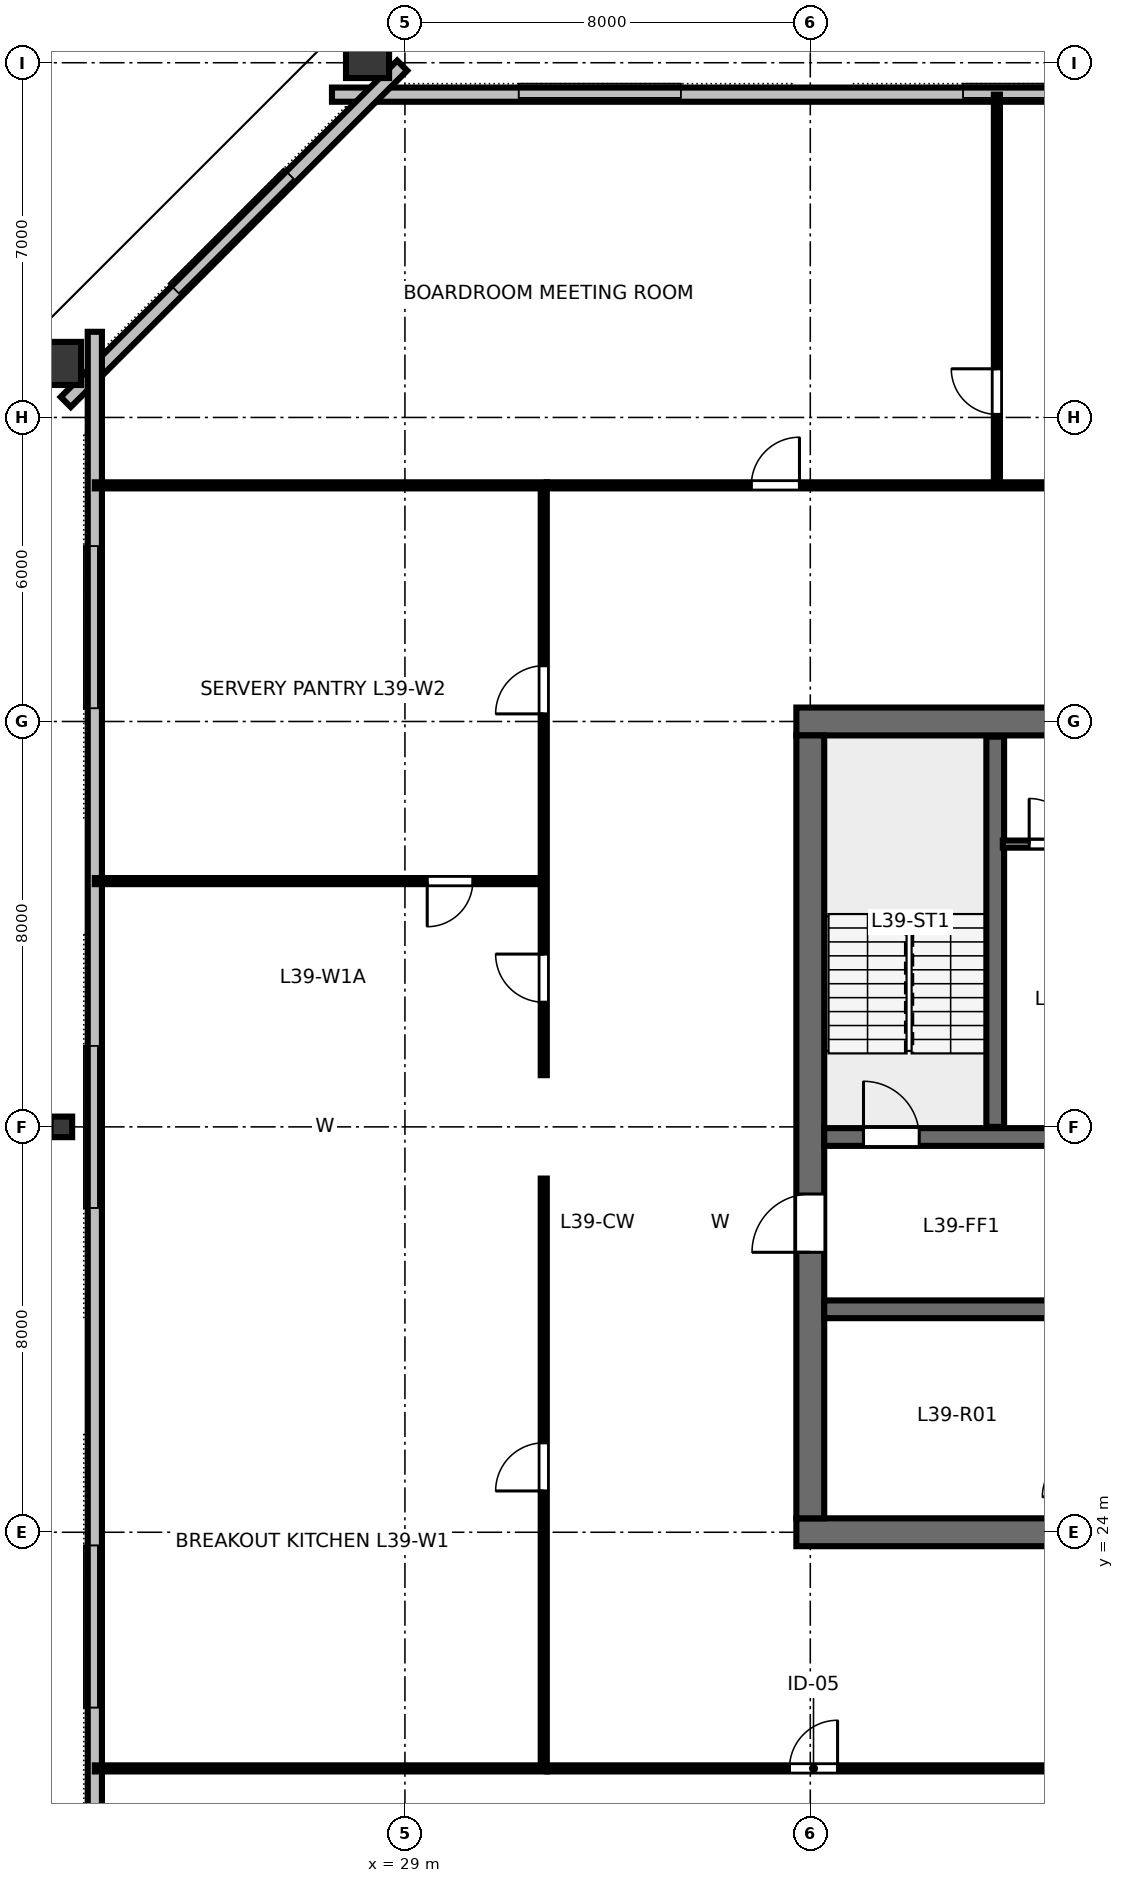
"""IFC4 building model, lengths in metres.
Left out: names, types, materials, properties, quantities, classifications, styles, units other than length and angle.
Written with IfcOpenShell. Run it as: python <this file> out.ifc"""

import sys

from ifc_helpers import new_model, si_unit, direction, frame, frame_2d, origin, origin_2d, place, context, subcontext, project, spatial, rectangle, hollow_rectangle, i_section, extrude, element, fill, save


model = new_model("IFC4")
c1 = context("Model", 3, precision=1e-05, world=origin(), true_north=direction((0.0, 1.0)))
c2 = subcontext(c1, "Body", "Model", "MODEL_VIEW")
j1 = project(units=[si_unit("LENGTHUNIT", "METRE"), si_unit("PLANEANGLEUNIT", "RADIAN")], contexts=[c1])
p1 = place(None, origin())
s1 = spatial("IfcSite", under=j1, at=p1, CompositionType="ELEMENT")
p2 = place(p1, origin())
s2 = spatial("IfcBuilding", under=s1, at=p2, CompositionType="ELEMENT")
p3 = place(p2, frame((0.0, 0.0, 149.2)))
s3 = spatial("IfcBuildingStorey", under=s2, at=p3, CompositionType="ELEMENT", Elevation=149.2)
p4 = place(p3, frame((36.725, 24.0, 0.0), z_axis=(0.0, 0.0, 1.0), x_axis=(1.0, 0.0, 0.0)))
e1 = element("IfcWall", 1, at=p4, inside=s3, PredefinedType="SHEAR", context=c2, shape_type="SweptSolid", body=[
    extrude(rectangle(XDim=18.55, YDim=0.55, at=frame_2d((9.275, 0.0))), origin(), (0.0, 0.0, 1.0), 3.36),
])
p5 = place(p4, frame((8.275, 0.0, 0.0)))
e2 = element("IfcOpeningElement", 2, at=p5, cuts=e1, PredefinedType="OPENING", context=c2, shape_type="SweptSolid", body=[
    extrude(rectangle(XDim=1.6, YDim=2.15, at=frame_2d((0.8, 1.075))), frame((0.0, 0.285, 0.0), z_axis=(0.0, -1.0, 0.0), x_axis=(1.0, 0.0, 0.0)), (0.0, 0.0, 1.0), 0.57),
])
p6 = place(p4, frame((13.675, 0.0, 0.0)))
e3 = element("IfcOpeningElement", 3, at=p6, cuts=e1, PredefinedType="OPENING", context=c2, shape_type="SweptSolid", body=[
    extrude(rectangle(XDim=1.6, YDim=2.15, at=frame_2d((0.8, 1.075))), frame((0.0, 0.285, 0.0), z_axis=(0.0, -1.0, 0.0), x_axis=(1.0, 0.0, 0.0)), (0.0, 0.0, 1.0), 0.57),
])
p7 = place(p3, frame((36.725, 40.0, 0.0), z_axis=(0.0, 0.0, 1.0), x_axis=(1.0, 0.0, 0.0)))
e4 = element("IfcWall", 4, at=p7, inside=s3, PredefinedType="SHEAR", context=c2, shape_type="SweptSolid", body=[
    extrude(rectangle(XDim=18.55, YDim=0.55, at=frame_2d((9.275, 0.0))), origin(), (0.0, 0.0, 1.0), 3.36),
])
p8 = place(p7, frame((8.775, 0.0, 0.0)))
e5 = element("IfcOpeningElement", 5, at=p8, cuts=e4, PredefinedType="OPENING", context=c2, shape_type="SweptSolid", body=[
    extrude(rectangle(XDim=1.0, YDim=2.15, at=frame_2d((0.5, 1.075))), frame((0.0, 0.285, 0.0), z_axis=(0.0, -1.0, 0.0), x_axis=(1.0, 0.0, 0.0)), (0.0, 0.0, 1.0), 0.57),
])
p9 = place(p3, frame((37.0, 24.275, 0.0), z_axis=(0.0, 0.0, 1.0), x_axis=(0.0, 1.0, 0.0)))
e6 = element("IfcWall", 6, at=p9, inside=s3, PredefinedType="SHEAR", context=c2, shape_type="SweptSolid", body=[
    extrude(rectangle(XDim=15.45, YDim=0.55, at=frame_2d((7.725, 0.0))), origin(), (0.0, 0.0, 1.0), 3.36),
])
p10 = place(p9, frame((5.25, 0.0, 0.0)))
e7 = element("IfcOpeningElement", 7, at=p10, cuts=e6, PredefinedType="OPENING", context=c2, shape_type="SweptSolid", body=[
    extrude(rectangle(XDim=1.15, YDim=2.15, at=frame_2d((0.575, 1.075))), frame((0.0, 0.285, 0.0), z_axis=(0.0, -1.0, 0.0), x_axis=(1.0, 0.0, 0.0)), (0.0, 0.0, 1.0), 0.57),
])
p11 = place(p3, frame((37.275, 31.8, 0.0), z_axis=(0.0, 0.0, 1.0), x_axis=(1.0, 0.0, 0.0)))
e8 = element("IfcWall", 8, at=p11, inside=s3, PredefinedType="SHEAR", context=c2, shape_type="SweptSolid", body=[
    extrude(rectangle(XDim=17.45, YDim=0.35, at=frame_2d((8.725, 0.0))), origin(), (0.0, 0.0, 1.0), 3.36),
])
p12 = place(p11, frame((0.775, 0.0, 0.0)))
e9 = element("IfcOpeningElement", 9, at=p12, cuts=e8, PredefinedType="OPENING", context=c2, shape_type="SweptSolid", body=[
    extrude(rectangle(XDim=1.1, YDim=2.15, at=frame_2d((0.55, 1.075))), frame((0.0, 0.185, 0.0), z_axis=(0.0, -1.0, 0.0), x_axis=(1.0, 0.0, 0.0)), (0.0, 0.0, 1.0), 0.37),
])
p13 = place(p11, frame((14.675, 0.0, 0.0)))
e10 = element("IfcOpeningElement", 10, at=p13, cuts=e8, PredefinedType="OPENING", context=c2, shape_type="SweptSolid", body=[
    extrude(rectangle(XDim=1.1, YDim=2.15, at=frame_2d((0.55, 1.075))), frame((0.0, 0.185, 0.0), z_axis=(0.0, -1.0, 0.0), x_axis=(1.0, 0.0, 0.0)), (0.0, 0.0, 1.0), 0.37),
])
p14 = place(p3, frame((37.275, 28.4, 0.0), z_axis=(0.0, 0.0, 1.0), x_axis=(1.0, 0.0, 0.0)))
e11 = element("IfcWall", 11, at=p14, inside=s3, PredefinedType="SHEAR", context=c2, shape_type="SweptSolid", body=[
    extrude(rectangle(XDim=17.45, YDim=0.35, at=frame_2d((8.725, 0.0))), origin(), (0.0, 0.0, 1.0), 3.36),
])
for number, where, z_axis, x_axis in (
    (12, (28.262, 53.198, 0.0), (0.0, 0.0, 1.0), (1.0, 0.0, 0.0)),
    (13, (22.109, 47.066, 0.0), (0.0, 0.0, 1.0), (0.0, 1.0, 0.0)),
):
    element("IfcColumn", number, at=place(p3, frame(where, z_axis=z_axis, x_axis=x_axis)), inside=s3, PredefinedType="COLUMN", context=c2, shape_type="SweptSolid", body=[
        extrude(hollow_rectangle(XDim=0.85, YDim=1.0, WallThickness=0.05, at=origin_2d()), origin(), (0.0, 0.0, 1.0), 3.358),
    ])
p15 = place(p3, frame((22.22, 32.0, 0.0), z_axis=(0.0, 0.0, 1.0), x_axis=(0.0, 1.0, 0.0)))
e14 = element("IfcColumn", 14, at=p15, inside=s3, PredefinedType="COLUMN", context=c2, shape_type="SweptSolid", body=[
    extrude(i_section(OverallWidth=0.406, OverallDepth=0.425, WebThickness=0.033, FlangeThickness=0.052, FilletRadius=0.025, at=origin_2d()), origin(), (0.0, 0.0, 1.0), 3.358),
])
p16 = place(p3, frame((64.44, 52.37, 0.0), z_axis=(0.0, 0.0, 1.0), x_axis=(-1.0, 0.0, 0.0)))
e15 = element("IfcWall", 15, at=p16, inside=s3, PredefinedType="STANDARD", context=c2, shape_type="SweptSolid", body=[
    extrude(rectangle(XDim=36.88, YDim=0.28, at=frame_2d((18.44, 0.0))), origin(), (0.0, 0.0, 1.0), 3.36),
])
p17 = place(p3, frame((28.946, 52.944, 0.0), z_axis=(0.0, 0.0, 1.0), x_axis=(-0.707106781187, -0.707106781187, 0.0)))
e16 = element("IfcWall", 16, at=p17, inside=s3, PredefinedType="STANDARD", context=c2, shape_type="SweptSolid", body=[
    extrude(rectangle(XDim=9.39, YDim=0.28, at=frame_2d((4.695, 0.0))), origin(), (0.0, 0.0, 1.0), 3.36),
])
p18 = place(p3, frame((22.88, 47.69, 0.0), z_axis=(0.0, 0.0, 1.0), x_axis=(0.0, -1.0, 0.0)))
e17 = element("IfcWall", 17, at=p18, inside=s3, PredefinedType="STANDARD", context=c2, shape_type="SweptSolid", body=[
    extrude(rectangle(XDim=31.38, YDim=0.28, at=frame_2d((15.69, 0.0))), origin(), (0.0, 0.0, 1.0), 3.36),
])
p19 = place(p3, frame((40.65, 32.0, 0.0), z_axis=(0.0, 0.0, 1.0), x_axis=(0.0, 1.0, 0.0)))
e18 = element("IfcWall", 18, at=p19, inside=s3, PredefinedType="SHEAR", context=c2, shape_type="SweptSolid", body=[
    extrude(rectangle(XDim=7.7, YDim=0.35, at=frame_2d((3.85, 0.0))), origin(), (0.0, 0.0, 1.0), 3.6),
])
p20 = place(p3, frame((40.8, 37.58, 0.0), z_axis=(0.0, 0.0, 1.0), x_axis=(1.0, 0.0, 0.0)))
e19 = element("IfcWall", 19, at=p20, inside=s3, PredefinedType="PARTITIONING", context=c2, shape_type="SweptSolid", body=[
    extrude(rectangle(XDim=10.4, YDim=0.14, at=frame_2d((5.2, 0.0))), origin(), (0.0, 0.0, 1.0), 3.36),
])
p21 = place(p20, frame((0.52, 0.0, 0.0)))
e20 = element("IfcOpeningElement", 20, at=p21, cuts=e19, PredefinedType="OPENING", context=c2, shape_type="SweptSolid", body=[
    extrude(rectangle(XDim=0.9, YDim=2.15, at=frame_2d((0.45, 1.075))), frame((0.0, 0.08, 0.0), z_axis=(0.0, -1.0, 0.0), x_axis=(1.0, 0.0, 0.0)), (0.0, 0.0, 1.0), 0.16),
])
p22 = place(p20, frame((2.6, 0.0, 0.0)))
e21 = element("IfcOpeningElement", 21, at=p22, cuts=e19, PredefinedType="OPENING", context=c2, shape_type="SweptSolid", body=[
    extrude(rectangle(XDim=0.9, YDim=2.15, at=frame_2d((0.45, 1.075))), frame((0.0, 0.08, 0.0), z_axis=(0.0, -1.0, 0.0), x_axis=(1.0, 0.0, 0.0)), (0.0, 0.0, 1.0), 0.16),
])
p23 = place(p20, frame((4.68, 0.0, 0.0)))
e22 = element("IfcOpeningElement", 22, at=p23, cuts=e19, PredefinedType="OPENING", context=c2, shape_type="SweptSolid", body=[
    extrude(rectangle(XDim=0.92, YDim=2.15, at=frame_2d((0.46, 1.075))), frame((0.0, 0.08, 0.0), z_axis=(0.0, -1.0, 0.0), x_axis=(1.0, 0.0, 0.0)), (0.0, 0.0, 1.0), 0.16),
])
p24 = place(p20, frame((6.76, 0.0, 0.0)))
e23 = element("IfcOpeningElement", 23, at=p24, cuts=e19, PredefinedType="OPENING", context=c2, shape_type="SweptSolid", body=[
    extrude(rectangle(XDim=0.9, YDim=2.15, at=frame_2d((0.45, 1.075))), frame((0.0, 0.08, 0.0), z_axis=(0.0, -1.0, 0.0), x_axis=(1.0, 0.0, 0.0)), (0.0, 0.0, 1.0), 0.16),
])
p25 = place(p20, frame((8.84, 0.0, 0.0)))
e24 = element("IfcOpeningElement", 24, at=p25, cuts=e19, PredefinedType="OPENING", context=c2, shape_type="SweptSolid", body=[
    extrude(rectangle(XDim=0.9, YDim=2.15, at=frame_2d((0.45, 1.075))), frame((0.0, 0.08, 0.0), z_axis=(0.0, -1.0, 0.0), x_axis=(1.0, 0.0, 0.0)), (0.0, 0.0, 1.0), 0.16),
])
p26 = place(p3, frame((31.8, 19.34, 0.0), z_axis=(0.0, 0.0, 1.0), x_axis=(1.0, 0.0, 0.0)))
e25 = element("IfcWall", 25, at=p26, inside=s3, PredefinedType="PARTITIONING", context=c2, shape_type="SweptSolid", body=[
    extrude(rectangle(XDim=28.4, YDim=0.12, at=frame_2d((14.2, 0.0))), origin(), (0.0, 0.0, 1.0), 2.64),
])
p27 = place(p26, frame((4.789, 0.0, 0.0)))
e26 = element("IfcOpeningElement", 26, at=p27, cuts=e25, PredefinedType="OPENING", context=c2, shape_type="SweptSolid", body=[
    extrude(rectangle(XDim=0.95, YDim=2.15, at=frame_2d((0.475, 1.075))), frame((0.0, 0.07, 0.0), z_axis=(0.0, -1.0, 0.0), x_axis=(1.0, 0.0, 0.0)), (0.0, 0.0, 1.0), 0.14),
])
p28 = place(p26, frame((12.708, 0.0, 0.0)))
e27 = element("IfcOpeningElement", 27, at=p28, cuts=e25, PredefinedType="OPENING", context=c2, shape_type="SweptSolid", body=[
    extrude(rectangle(XDim=0.95, YDim=2.15, at=frame_2d((0.475, 1.075))), frame((0.0, 0.07, 0.0), z_axis=(0.0, -1.0, 0.0), x_axis=(1.0, 0.0, 0.0)), (0.0, 0.0, 1.0), 0.14),
])
p29 = place(p26, frame((21.645, 0.0, 0.0)))
e28 = element("IfcOpeningElement", 28, at=p29, cuts=e25, PredefinedType="OPENING", context=c2, shape_type="SweptSolid", body=[
    extrude(rectangle(XDim=0.95, YDim=2.15, at=frame_2d((0.475, 1.075))), frame((0.0, 0.07, 0.0), z_axis=(0.0, -1.0, 0.0), x_axis=(1.0, 0.0, 0.0)), (0.0, 0.0, 1.0), 0.14),
])
p30 = place(p3, frame((40.683, 44.66, 0.0), z_axis=(0.0, 0.0, 1.0), x_axis=(0.0, 1.0, 0.0)))
e29 = element("IfcWall", 29, at=p30, inside=s3, PredefinedType="PARTITIONING", context=c2, shape_type="SweptSolid", body=[
    extrude(rectangle(XDim=7.71, YDim=0.12, at=frame_2d((3.855, 0.0))), origin(), (0.0, 0.0, 1.0), 2.64),
])
p31 = place(p30, frame((1.4, 0.0, 0.0)))
e30 = element("IfcOpeningElement", 30, at=p31, cuts=e29, PredefinedType="OPENING", context=c2, shape_type="SweptSolid", body=[
    extrude(rectangle(XDim=0.9, YDim=2.15, at=frame_2d((0.45, 1.075))), frame((0.0, 0.07, 0.0), z_axis=(0.0, -1.0, 0.0), x_axis=(1.0, 0.0, 0.0)), (0.0, 0.0, 1.0), 0.14),
])
p32 = place(p3, frame((31.8, 44.66, 0.0), z_axis=(0.0, 0.0, 1.0), x_axis=(1.0, 0.0, 0.0)))
e31 = element("IfcWall", 31, at=p32, inside=s3, PredefinedType="PARTITIONING", context=c2, shape_type="SweptSolid", body=[
    extrude(rectangle(XDim=28.4, YDim=0.12, at=frame_2d((14.2, 0.0))), origin(), (0.0, 0.0, 1.0), 2.64),
])
p33 = place(p32, frame((4.036, 0.0, 0.0)))
e32 = element("IfcOpeningElement", 32, at=p33, cuts=e31, PredefinedType="OPENING", context=c2, shape_type="SweptSolid", body=[
    extrude(rectangle(XDim=0.95, YDim=2.15, at=frame_2d((0.475, 1.075))), frame((0.0, 0.07, 0.0), z_axis=(0.0, -1.0, 0.0), x_axis=(1.0, 0.0, 0.0)), (0.0, 0.0, 1.0), 0.14),
])
p34 = place(p32, frame((12.256, 0.0, 0.0)))
e33 = element("IfcOpeningElement", 33, at=p34, cuts=e31, PredefinedType="OPENING", context=c2, shape_type="SweptSolid", body=[
    extrude(rectangle(XDim=0.95, YDim=2.15, at=frame_2d((0.475, 1.075))), frame((0.0, 0.07, 0.0), z_axis=(0.0, -1.0, 0.0), x_axis=(1.0, 0.0, 0.0)), (0.0, 0.0, 1.0), 0.14),
])
p35 = place(p32, frame((18.246, 0.0, 0.0)))
e34 = element("IfcOpeningElement", 34, at=p35, cuts=e31, PredefinedType="OPENING", context=c2, shape_type="SweptSolid", body=[
    extrude(rectangle(XDim=0.95, YDim=2.15, at=frame_2d((0.475, 1.075))), frame((0.0, 0.07, 0.0), z_axis=(0.0, -1.0, 0.0), x_axis=(1.0, 0.0, 0.0)), (0.0, 0.0, 1.0), 0.14),
])
p36 = place(p32, frame((24.086, 0.0, 0.0)))
e35 = element("IfcOpeningElement", 35, at=p36, cuts=e31, PredefinedType="OPENING", context=c2, shape_type="SweptSolid", body=[
    extrude(rectangle(XDim=0.95, YDim=2.15, at=frame_2d((0.475, 1.075))), frame((0.0, 0.07, 0.0), z_axis=(0.0, -1.0, 0.0), x_axis=(1.0, 0.0, 0.0)), (0.0, 0.0, 1.0), 0.14),
])
p37 = place(p3, frame((31.74, 36.85, 0.0), z_axis=(0.0, 0.0, 1.0), x_axis=(-1.0, 0.0, 0.0)))
e36 = element("IfcWall", 36, at=p37, inside=s3, PredefinedType="PARTITIONING", context=c2, shape_type="SweptSolid", body=[
    extrude(rectangle(XDim=8.86, YDim=0.12, at=frame_2d((4.43, 0.0))), origin(), (0.0, 0.0, 1.0), 2.64),
])
p38 = place(p37, frame((1.4, 0.0, 0.0)))
e37 = element("IfcOpeningElement", 37, at=p38, cuts=e36, PredefinedType="OPENING", context=c2, shape_type="SweptSolid", body=[
    extrude(rectangle(XDim=0.9, YDim=2.15, at=frame_2d((0.45, 1.075))), frame((0.0, 0.07, 0.0), z_axis=(0.0, -1.0, 0.0), x_axis=(1.0, 0.0, 0.0)), (0.0, 0.0, 1.0), 0.14),
])
p39 = place(p3, frame((31.74, 19.4, 0.0), z_axis=(0.0, 0.0, 1.0), x_axis=(0.0, 1.0, 0.0)))
e38 = element("IfcWall", 38, at=p39, inside=s3, PredefinedType="PARTITIONING", context=c2, shape_type="SweptSolid", body=[
    extrude(rectangle(XDim=11.58, YDim=0.12, at=frame_2d((5.79, 0.0))), origin(), (0.0, 0.0, 1.0), 2.64),
])
p40 = place(p39, frame((5.415, 0.0, 0.0)))
e39 = element("IfcOpeningElement", 39, at=p40, cuts=e38, PredefinedType="OPENING", context=c2, shape_type="SweptSolid", body=[
    extrude(rectangle(XDim=0.95, YDim=2.15, at=frame_2d((0.475, 1.075))), frame((0.0, 0.07, 0.0), z_axis=(0.0, -1.0, 0.0), x_axis=(1.0, 0.0, 0.0)), (0.0, 0.0, 1.0), 0.14),
])
p41 = place(p3, frame((31.74, 33.02, 0.0), z_axis=(0.0, 0.0, 1.0), x_axis=(0.0, 1.0, 0.0)))
e40 = element("IfcWall", 40, at=p41, inside=s3, PredefinedType="PARTITIONING", context=c2, shape_type="SweptSolid", body=[
    extrude(rectangle(XDim=11.58, YDim=0.12, at=frame_2d((5.79, 0.0))), origin(), (0.0, 0.0, 1.0), 2.64),
])
p42 = place(p41, frame((1.44, 0.0, 0.0)))
e41 = element("IfcOpeningElement", 41, at=p42, cuts=e40, PredefinedType="OPENING", context=c2, shape_type="SweptSolid", body=[
    extrude(rectangle(XDim=0.95, YDim=2.15, at=frame_2d((0.475, 1.075))), frame((0.0, 0.07, 0.0), z_axis=(0.0, -1.0, 0.0), x_axis=(1.0, 0.0, 0.0)), (0.0, 0.0, 1.0), 0.14),
])
p43 = place(p41, frame((7.13, 0.0, 0.0)))
e42 = element("IfcOpeningElement", 42, at=p43, cuts=e40, PredefinedType="OPENING", context=c2, shape_type="SweptSolid", body=[
    extrude(rectangle(XDim=0.95, YDim=2.15, at=frame_2d((0.475, 1.075))), frame((0.0, 0.07, 0.0), z_axis=(0.0, -1.0, 0.0), x_axis=(1.0, 0.0, 0.0)), (0.0, 0.0, 1.0), 0.14),
])
for number, where, z_axis, x_axis in (
    (43, (31.8, 19.34, 0.0), (0.0, 0.0, 1.0), (-1.0, 0.0, 0.0)),
    (44, (31.8, 44.66, 0.0), (0.0, 0.0, 1.0), (-1.0, 0.0, 0.0)),
):
    element("IfcWall", number, at=place(p3, frame(where, z_axis=z_axis, x_axis=x_axis)), inside=s3, PredefinedType="PARTITIONING", context=c2, shape_type="SweptSolid", body=[
        extrude(rectangle(XDim=8.92, YDim=0.12, at=frame_2d((4.46, 0.0))), origin(), (0.0, 0.0, 1.0), 2.64),
    ])
p44 = place(p12, origin())
e45 = element("IfcDoor", 45, at=p44, inside=s3, OperationType="SINGLE_SWING_LEFT", PredefinedType="DOOR", context=c2, shape_type="SweptSolid", body=[
    extrude(rectangle(XDim=1.1, YDim=2.15, at=frame_2d((0.55, 1.075))), frame((0.0, 0.025, 0.0), z_axis=(0.0, -1.0, 0.0), x_axis=(1.0, 0.0, 0.0)), (0.0, 0.0, 1.0), 0.05),
])
fill(e9, e45)
p45 = place(p10, origin())
e46 = element("IfcDoor", 46, at=p45, inside=s3, OperationType="SINGLE_SWING_LEFT", PredefinedType="DOOR", context=c2, shape_type="SweptSolid", body=[
    extrude(rectangle(XDim=1.15, YDim=2.15, at=frame_2d((0.575, 1.075))), frame((0.0, 0.025, 0.0), z_axis=(0.0, -1.0, 0.0), x_axis=(1.0, 0.0, 0.0)), (0.0, 0.0, 1.0), 0.05),
])
fill(e7, e46)
p46 = place(p21, origin())
e47 = element("IfcDoor", 47, at=p46, inside=s3, OperationType="SINGLE_SWING_LEFT", PredefinedType="DOOR", context=c2, shape_type="SweptSolid", body=[
    extrude(rectangle(XDim=0.9, YDim=2.15, at=frame_2d((0.45, 1.075))), frame((0.0, 0.025, 0.0), z_axis=(0.0, -1.0, 0.0), x_axis=(1.0, 0.0, 0.0)), (0.0, 0.0, 1.0), 0.05),
])
fill(e20, e47)
p47 = place(p27, origin())
e48 = element("IfcDoor", 48, at=p47, inside=s3, OperationType="SINGLE_SWING_RIGHT", PredefinedType="DOOR", context=c2, shape_type="SweptSolid", body=[
    extrude(rectangle(XDim=0.95, YDim=2.15, at=frame_2d((0.475, 1.075))), frame((0.0, 0.025, 0.0), z_axis=(0.0, -1.0, 0.0), x_axis=(1.0, 0.0, 0.0)), (0.0, 0.0, 1.0), 0.05),
])
fill(e26, e48)
p48 = place(p31, origin())
e49 = element("IfcDoor", 49, at=p48, inside=s3, OperationType="SINGLE_SWING_RIGHT", PredefinedType="DOOR", context=c2, shape_type="SweptSolid", body=[
    extrude(rectangle(XDim=0.9, YDim=2.15, at=frame_2d((0.45, 1.075))), frame((0.0, 0.025, 0.0), z_axis=(0.0, -1.0, 0.0), x_axis=(1.0, 0.0, 0.0)), (0.0, 0.0, 1.0), 0.05),
])
fill(e30, e49)
p49 = place(p33, origin())
e50 = element("IfcDoor", 50, at=p49, inside=s3, OperationType="SINGLE_SWING_RIGHT", PredefinedType="DOOR", context=c2, shape_type="SweptSolid", body=[
    extrude(rectangle(XDim=0.95, YDim=2.15, at=frame_2d((0.475, 1.075))), frame((0.0, 0.025, 0.0), z_axis=(0.0, -1.0, 0.0), x_axis=(1.0, 0.0, 0.0)), (0.0, 0.0, 1.0), 0.05),
])
fill(e32, e50)
p50 = place(p38, origin())
e51 = element("IfcDoor", 51, at=p50, inside=s3, OperationType="SINGLE_SWING_RIGHT", PredefinedType="DOOR", context=c2, shape_type="SweptSolid", body=[
    extrude(rectangle(XDim=0.9, YDim=2.15, at=frame_2d((0.45, 1.075))), frame((0.0, 0.025, 0.0), z_axis=(0.0, -1.0, 0.0), x_axis=(1.0, 0.0, 0.0)), (0.0, 0.0, 1.0), 0.05),
])
fill(e37, e51)
p51 = place(p40, origin())
e52 = element("IfcDoor", 52, at=p51, inside=s3, OperationType="SINGLE_SWING_LEFT", PredefinedType="DOOR", context=c2, shape_type="SweptSolid", body=[
    extrude(rectangle(XDim=0.95, YDim=2.15, at=frame_2d((0.475, 1.075))), frame((0.0, 0.025, 0.0), z_axis=(0.0, -1.0, 0.0), x_axis=(1.0, 0.0, 0.0)), (0.0, 0.0, 1.0), 0.05),
])
fill(e39, e52)
p52 = place(p42, origin())
e53 = element("IfcDoor", 53, at=p52, inside=s3, OperationType="SINGLE_SWING_RIGHT", PredefinedType="DOOR", context=c2, shape_type="SweptSolid", body=[
    extrude(rectangle(XDim=0.95, YDim=2.15, at=frame_2d((0.475, 1.075))), frame((0.0, 0.025, 0.0), z_axis=(0.0, -1.0, 0.0), x_axis=(1.0, 0.0, 0.0)), (0.0, 0.0, 1.0), 0.05),
])
fill(e41, e53)
p53 = place(p43, origin())
e54 = element("IfcDoor", 54, at=p53, inside=s3, OperationType="SINGLE_SWING_LEFT", PredefinedType="DOOR", context=c2, shape_type="SweptSolid", body=[
    extrude(rectangle(XDim=0.95, YDim=2.15, at=frame_2d((0.475, 1.075))), frame((0.0, 0.025, 0.0), z_axis=(0.0, -1.0, 0.0), x_axis=(1.0, 0.0, 0.0)), (0.0, 0.0, 1.0), 0.05),
])
fill(e42, e54)
save(model, sys.argv[1])
